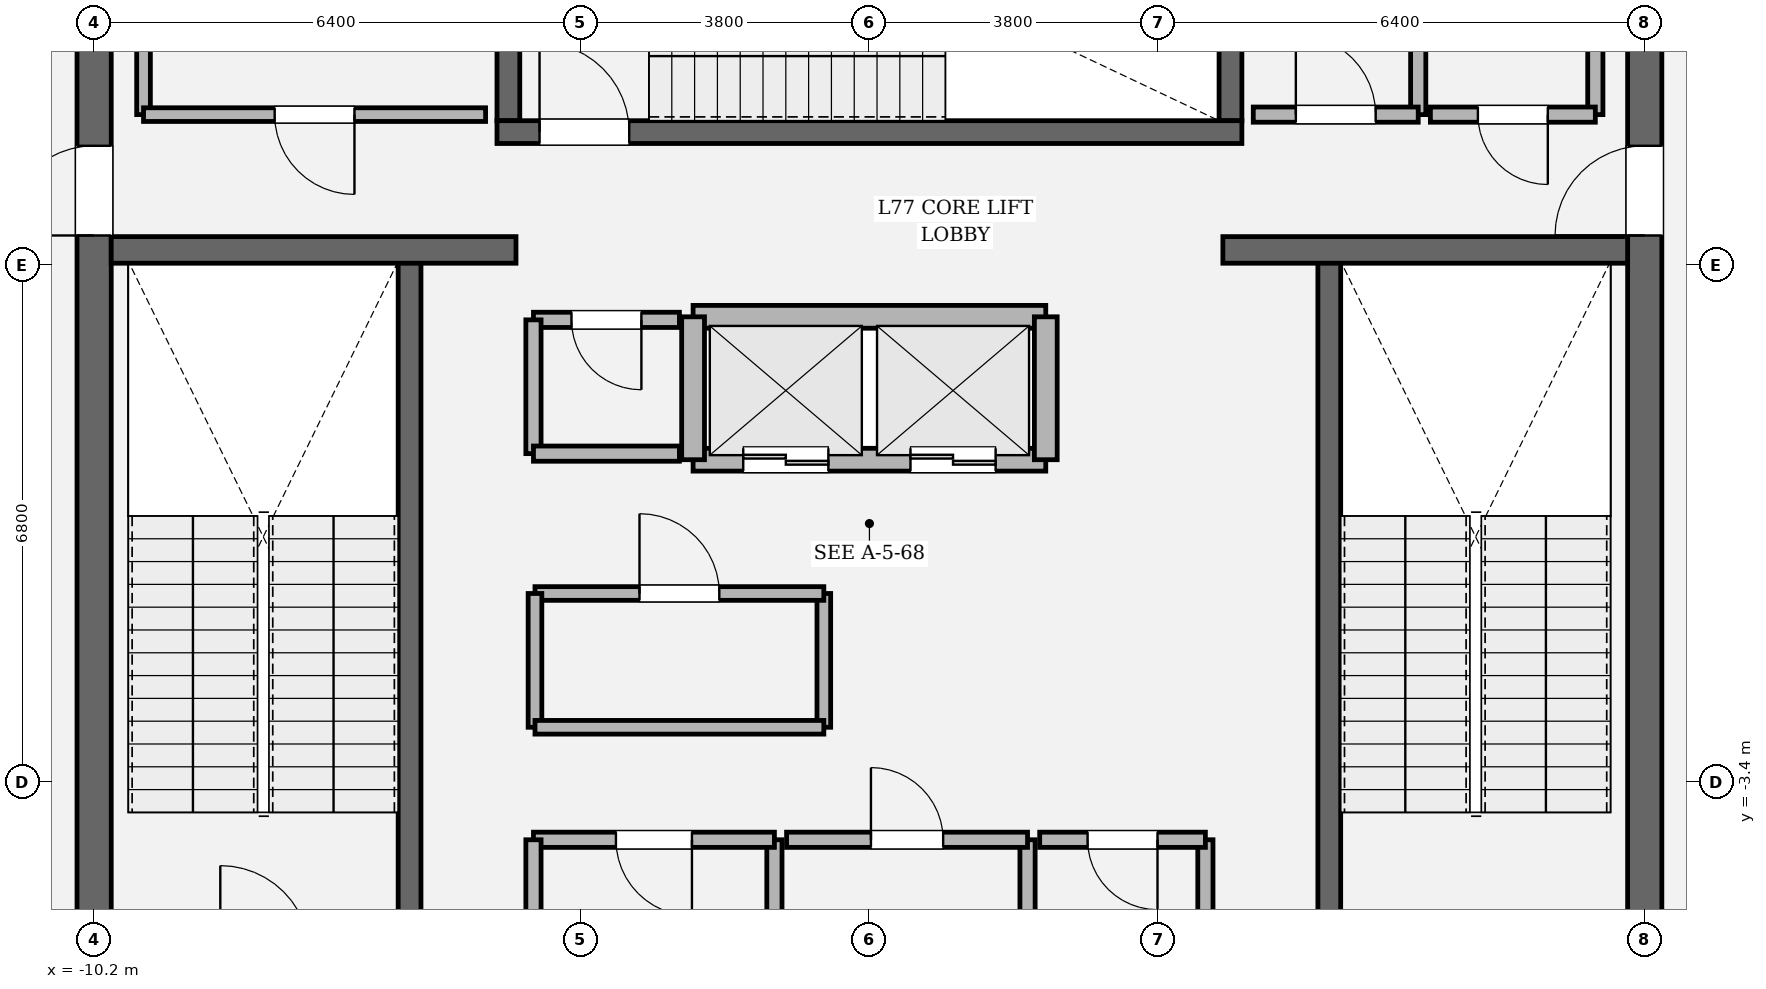
"""IFC4 building model, lengths in metres.
Left out: names, types, materials, properties, quantities, classifications, styles, units other than length and angle.
Written with IfcOpenShell. Run it as: python <this file> out.ifc"""

import sys

from ifc_helpers import new_model, si_unit, direction, frame, frame_2d, origin, place, context, subcontext, project, spatial, rectangle, extrude, element, fill, save


model = new_model("IFC4")
c1 = context("Model", 3, precision=1e-05, world=origin(), true_north=direction((0.0, 1.0)))
c2 = subcontext(c1, "Body", "Model", "MODEL_VIEW")
j1 = project(units=[si_unit("LENGTHUNIT", "METRE"), si_unit("PLANEANGLEUNIT", "RADIAN")], contexts=[c1])
p1 = place(None, origin())
s1 = spatial("IfcSite", under=j1, at=p1, CompositionType="ELEMENT")
p2 = place(p1, origin())
s2 = spatial("IfcBuilding", under=s1, at=p2, CompositionType="ELEMENT")
p3 = place(p2, frame((0.0, 0.0, 325.8)))
s3 = spatial("IfcBuildingStorey", under=s2, at=p3, CompositionType="ELEMENT", Elevation=325.8)
p4 = place(p3, frame((-10.2, -8.975, 0.0), z_axis=(0.0, 0.0, 1.0), x_axis=(0.0, 1.0, 0.0)))
e1 = element("IfcWall", 1, at=p4, inside=s3, PredefinedType="SHEAR", context=c2, shape_type="SweptSolid", body=[
    extrude(rectangle(XDim=17.95, YDim=0.45, at=frame_2d((8.975, 0.0))), origin(), (0.0, 0.0, 1.0), 4.2),
])
p5 = place(p4, frame((12.765, 0.0, 0.0)))
e2 = element("IfcOpeningElement", 2, at=p5, cuts=e1, PredefinedType="OPENING", context=c2, shape_type="SweptSolid", body=[
    extrude(rectangle(XDim=1.18, YDim=2.2, at=frame_2d((0.59, 1.1))), frame((0.0, 0.235, 0.0), z_axis=(0.0, -1.0, 0.0), x_axis=(1.0, 0.0, 0.0)), (0.0, 0.0, 1.0), 0.47),
])
p6 = place(p3, frame((10.2, 8.975, 0.0), z_axis=(0.0, 0.0, 1.0), x_axis=(0.0, -1.0, 0.0)))
e3 = element("IfcWall", 3, at=p6, inside=s3, PredefinedType="SHEAR", context=c2, shape_type="SweptSolid", body=[
    extrude(rectangle(XDim=17.95, YDim=0.45, at=frame_2d((8.975, 0.0))), origin(), (0.0, 0.0, 1.0), 4.2),
])
p7 = place(p6, frame((4.005, 0.0, 0.0)))
e4 = element("IfcOpeningElement", 4, at=p7, cuts=e3, PredefinedType="OPENING", context=c2, shape_type="SweptSolid", body=[
    extrude(rectangle(XDim=1.18, YDim=2.2, at=frame_2d((0.59, 1.1))), frame((0.0, 0.235, 0.0), z_axis=(0.0, -1.0, 0.0), x_axis=(1.0, 0.0, 0.0)), (0.0, 0.0, 1.0), 0.47),
])
for number, where, z_axis, x_axis in (
    (5, (-6.05, -5.5, 0.0), (0.0, 0.0, 1.0), (0.0, 1.0, 0.0)),
    (6, (6.05, 3.45, 0.0), (0.0, 0.0, 1.0), (0.0, -1.0, 0.0)),
):
    element("IfcWall", number, at=place(p3, frame(where, z_axis=z_axis, x_axis=x_axis)), inside=s3, PredefinedType="SOLIDWALL", context=c2, shape_type="SweptSolid", body=[
        extrude(rectangle(XDim=8.95, YDim=0.3, at=frame_2d((4.475, 0.0))), origin(), (0.0, 0.0, 1.0), 4.2),
    ])
for number, where, z_axis, x_axis in (
    (7, (-4.75, 5.3, 0.0), (0.0, 0.0, 1.0), (0.0, 1.0, 0.0)),
    (8, (4.75, 8.975, 0.0), (0.0, 0.0, 1.0), (0.0, -1.0, 0.0)),
):
    element("IfcWall", number, at=place(p3, frame(where, z_axis=z_axis, x_axis=x_axis)), inside=s3, PredefinedType="SOLIDWALL", context=c2, shape_type="SweptSolid", body=[
        extrude(rectangle(XDim=3.675, YDim=0.3, at=frame_2d((1.837, 0.0))), origin(), (0.0, 0.0, 1.0), 4.2),
    ])
p8 = place(p3, frame((-4.9, 5.15, 0.0), z_axis=(0.0, 0.0, 1.0), x_axis=(1.0, 0.0, 0.0)))
e9 = element("IfcWall", 9, at=p8, inside=s3, PredefinedType="SOLIDWALL", context=c2, shape_type="SweptSolid", body=[
    extrude(rectangle(XDim=9.8, YDim=0.3, at=frame_2d((4.9, 0.0))), origin(), (0.0, 0.0, 1.0), 4.2),
])
p9 = place(p8, frame((0.56, 0.0, 0.0)))
e10 = element("IfcOpeningElement", 10, at=p9, cuts=e9, PredefinedType="OPENING", context=c2, shape_type="SweptSolid", body=[
    extrude(rectangle(XDim=1.18, YDim=2.2, at=frame_2d((0.59, 1.1))), frame((0.0, 0.16, 0.0), z_axis=(0.0, -1.0, 0.0), x_axis=(1.0, 0.0, 0.0)), (0.0, 0.0, 1.0), 0.32),
])
for number, where, z_axis, x_axis in (
    (11, (-9.975, 3.6, 0.0), (0.0, 0.0, 1.0), (1.0, 0.0, 0.0)),
    (12, (4.65, 3.6, 0.0), (0.0, 0.0, 1.0), (1.0, 0.0, 0.0)),
):
    element("IfcWall", number, at=place(p3, frame(where, z_axis=z_axis, x_axis=x_axis)), inside=s3, PredefinedType="SOLIDWALL", context=c2, shape_type="SweptSolid", body=[
        extrude(rectangle(XDim=5.325, YDim=0.35, at=frame_2d((2.663, 0.0))), origin(), (0.0, 0.0, 1.0), 4.2),
    ])
p10 = place(p3, frame((-2.32, 0.84, 0.0), z_axis=(0.0, 0.0, 1.0), x_axis=(1.0, 0.0, 0.0)))
e13 = element("IfcWall", 13, at=p10, inside=s3, PredefinedType="SOLIDWALL", context=c2, shape_type="SweptSolid", body=[
    extrude(rectangle(XDim=4.64, YDim=0.3, at=frame_2d((2.32, 0.0))), origin(), (0.0, 0.0, 1.0), 4.0),
])
p11 = place(p10, frame((0.66, 0.0, 0.0)))
e14 = element("IfcOpeningElement", 14, at=p11, cuts=e13, PredefinedType="OPENING", context=c2, shape_type="SweptSolid", body=[
    extrude(rectangle(XDim=1.12, YDim=2.25, at=frame_2d((0.56, 1.125))), frame((0.0, 0.16, 0.0), z_axis=(0.0, -1.0, 0.0), x_axis=(1.0, 0.0, 0.0)), (0.0, 0.0, 1.0), 0.32),
])
p12 = place(p10, frame((2.86, 0.0, 0.0)))
e15 = element("IfcOpeningElement", 15, at=p12, cuts=e13, PredefinedType="OPENING", context=c2, shape_type="SweptSolid", body=[
    extrude(rectangle(XDim=1.12, YDim=2.25, at=frame_2d((0.56, 1.125))), frame((0.0, 0.16, 0.0), z_axis=(0.0, -1.0, 0.0), x_axis=(1.0, 0.0, 0.0)), (0.0, 0.0, 1.0), 0.32),
])
p13 = place(p3, frame((-2.32, 2.72, 0.0), z_axis=(0.0, 0.0, 1.0), x_axis=(1.0, 0.0, 0.0)))
e16 = element("IfcWall", 16, at=p13, inside=s3, PredefinedType="SOLIDWALL", context=c2, shape_type="SweptSolid", body=[
    extrude(rectangle(XDim=4.64, YDim=0.3, at=frame_2d((2.32, 0.0))), origin(), (0.0, 0.0, 1.0), 4.0),
])
for number, where, z_axis, x_axis in (
    (17, (-2.32, 0.84, 0.0), (0.0, 0.0, 1.0), (0.0, 1.0, 0.0)),
    (18, (2.32, 0.84, 0.0), (0.0, 0.0, 1.0), (0.0, 1.0, 0.0)),
):
    element("IfcWall", number, at=place(p3, frame(where, z_axis=z_axis, x_axis=x_axis)), inside=s3, PredefinedType="SOLIDWALL", context=c2, shape_type="SweptSolid", body=[
        extrude(rectangle(XDim=1.88, YDim=0.3, at=frame_2d((0.94, 0.0))), origin(), (0.0, 0.0, 1.0), 4.0),
    ])
p14 = place(p3, frame((-1.25, -5.9, 0.0), z_axis=(0.0, 0.0, 1.0), x_axis=(0.0, 1.0, 0.0)))
e19 = element("IfcWall", 19, at=p14, inside=s3, PredefinedType="SOLIDWALL", context=c2, shape_type="SweptSolid", body=[
    extrude(rectangle(XDim=1.74, YDim=0.2, at=frame_2d((0.87, 0.0))), origin(), (0.0, 0.0, 1.0), 4.0),
])
p15 = place(p3, frame((-1.25, -4.16, 0.0), z_axis=(0.0, 0.0, 1.0), x_axis=(-1.0, 0.0, 0.0)))
e20 = element("IfcWall", 20, at=p15, inside=s3, PredefinedType="SOLIDWALL", context=c2, shape_type="SweptSolid", body=[
    extrude(rectangle(XDim=3.17, YDim=0.2, at=frame_2d((1.585, 0.0))), origin(), (0.0, 0.0, 1.0), 4.0),
])
p16 = place(p15, frame((1.085, 0.0, 0.0)))
e21 = element("IfcOpeningElement", 21, at=p16, cuts=e20, PredefinedType="OPENING", context=c2, shape_type="SweptSolid", body=[
    extrude(rectangle(XDim=1.0, YDim=2.15, at=frame_2d((0.5, 1.075))), frame((0.0, 0.11, 0.0), z_axis=(0.0, -1.0, 0.0), x_axis=(1.0, 0.0, 0.0)), (0.0, 0.0, 1.0), 0.22),
])
for number, where, z_axis, x_axis in (
    (22, (-4.42, -4.16, 0.0), (0.0, 0.0, 1.0), (0.0, -1.0, 0.0)),
    (23, (2.08, -5.9, 0.0), (0.0, 0.0, 1.0), (0.0, 1.0, 0.0)),
):
    element("IfcWall", number, at=place(p3, frame(where, z_axis=z_axis, x_axis=x_axis)), inside=s3, PredefinedType="SOLIDWALL", context=c2, shape_type="SweptSolid", body=[
        extrude(rectangle(XDim=1.74, YDim=0.2, at=frame_2d((0.87, 0.0))), origin(), (0.0, 0.0, 1.0), 4.0),
    ])
p17 = place(p3, frame((2.08, -4.16, 0.0), z_axis=(0.0, 0.0, 1.0), x_axis=(-1.0, 0.0, 0.0)))
e24 = element("IfcWall", 24, at=p17, inside=s3, PredefinedType="SOLIDWALL", context=c2, shape_type="SweptSolid", body=[
    extrude(rectangle(XDim=3.17, YDim=0.2, at=frame_2d((1.585, 0.0))), origin(), (0.0, 0.0, 1.0), 4.0),
])
p18 = place(p17, frame((1.11, 0.0, 0.0)))
e25 = element("IfcOpeningElement", 25, at=p18, cuts=e24, PredefinedType="OPENING", context=c2, shape_type="SweptSolid", body=[
    extrude(rectangle(XDim=0.95, YDim=2.15, at=frame_2d((0.475, 1.075))), frame((0.0, 0.11, 0.0), z_axis=(0.0, -1.0, 0.0), x_axis=(1.0, 0.0, 0.0)), (0.0, 0.0, 1.0), 0.22),
])
p19 = place(p3, frame((4.42, -5.9, 0.0), z_axis=(0.0, 0.0, 1.0), x_axis=(0.0, 1.0, 0.0)))
e26 = element("IfcWall", 26, at=p19, inside=s3, PredefinedType="SOLIDWALL", context=c2, shape_type="SweptSolid", body=[
    extrude(rectangle(XDim=1.74, YDim=0.2, at=frame_2d((0.87, 0.0))), origin(), (0.0, 0.0, 1.0), 4.0),
])
p20 = place(p3, frame((4.42, -4.16, 0.0), z_axis=(0.0, 0.0, 1.0), x_axis=(-1.0, 0.0, 0.0)))
e27 = element("IfcWall", 27, at=p20, inside=s3, PredefinedType="SOLIDWALL", context=c2, shape_type="SweptSolid", body=[
    extrude(rectangle(XDim=2.18, YDim=0.2, at=frame_2d((1.09, 0.0))), origin(), (0.0, 0.0, 1.0), 4.0),
])
p21 = place(p20, frame((0.63, 0.0, 0.0)))
e28 = element("IfcOpeningElement", 28, at=p21, cuts=e27, PredefinedType="OPENING", context=c2, shape_type="SweptSolid", body=[
    extrude(rectangle(XDim=0.92, YDim=2.1, at=frame_2d((0.46, 1.05))), frame((0.0, 0.11, 0.0), z_axis=(0.0, -1.0, 0.0), x_axis=(1.0, 0.0, 0.0)), (0.0, 0.0, 1.0), 0.22),
])
p22 = place(p3, frame((-0.6, -2.68, 0.0), z_axis=(0.0, 0.0, 1.0), x_axis=(0.0, 1.0, 0.0)))
e29 = element("IfcWall", 29, at=p22, inside=s3, PredefinedType="PARTITIONING", context=c2, shape_type="SweptSolid", body=[
    extrude(rectangle(XDim=1.76, YDim=0.18, at=frame_2d((0.88, 0.0))), origin(), (0.0, 0.0, 1.0), 4.0),
])
p23 = place(p3, frame((-0.6, -0.92, 0.0), z_axis=(0.0, 0.0, 1.0), x_axis=(-1.0, 0.0, 0.0)))
e30 = element("IfcWall", 30, at=p23, inside=s3, PredefinedType="PARTITIONING", context=c2, shape_type="SweptSolid", body=[
    extrude(rectangle(XDim=3.8, YDim=0.18, at=frame_2d((1.9, 0.0))), origin(), (0.0, 0.0, 1.0), 4.0),
])
p24 = place(p23, frame((1.375, 0.0, 0.0)))
e31 = element("IfcOpeningElement", 31, at=p24, cuts=e30, PredefinedType="OPENING", context=c2, shape_type="SweptSolid", body=[
    extrude(rectangle(XDim=1.05, YDim=2.2, at=frame_2d((0.525, 1.1))), frame((0.0, 0.1, 0.0), z_axis=(0.0, -1.0, 0.0), x_axis=(1.0, 0.0, 0.0)), (0.0, 0.0, 1.0), 0.2),
])
p25 = place(p3, frame((-4.4, -0.92, 0.0), z_axis=(0.0, 0.0, 1.0), x_axis=(0.0, -1.0, 0.0)))
e32 = element("IfcWall", 32, at=p25, inside=s3, PredefinedType="PARTITIONING", context=c2, shape_type="SweptSolid", body=[
    extrude(rectangle(XDim=1.76, YDim=0.18, at=frame_2d((0.88, 0.0))), origin(), (0.0, 0.0, 1.0), 4.0),
])
p26 = place(p3, frame((-4.4, -2.68, 0.0), z_axis=(0.0, 0.0, 1.0), x_axis=(1.0, 0.0, 0.0)))
e33 = element("IfcWall", 33, at=p26, inside=s3, PredefinedType="PARTITIONING", context=c2, shape_type="SweptSolid", body=[
    extrude(rectangle(XDim=3.8, YDim=0.18, at=frame_2d((1.9, 0.0))), origin(), (0.0, 0.0, 1.0), 4.0),
])
p27 = place(p3, frame((-2.5, 2.68, 0.0), z_axis=(0.0, 0.0, 1.0), x_axis=(-1.0, 0.0, 0.0)))
e34 = element("IfcWall", 34, at=p27, inside=s3, PredefinedType="SOLIDWALL", context=c2, shape_type="SweptSolid", body=[
    extrude(rectangle(XDim=1.92, YDim=0.2, at=frame_2d((0.96, 0.0))), origin(), (0.0, 0.0, 1.0), 4.0),
])
p28 = place(p27, frame((0.5, 0.0, 0.0)))
e35 = element("IfcOpeningElement", 35, at=p28, cuts=e34, PredefinedType="OPENING", context=c2, shape_type="SweptSolid", body=[
    extrude(rectangle(XDim=0.92, YDim=2.1, at=frame_2d((0.46, 1.05))), frame((0.0, 0.11, 0.0), z_axis=(0.0, -1.0, 0.0), x_axis=(1.0, 0.0, 0.0)), (0.0, 0.0, 1.0), 0.22),
])
p29 = place(p3, frame((-4.42, 2.68, 0.0), z_axis=(0.0, 0.0, 1.0), x_axis=(0.0, -1.0, 0.0)))
e36 = element("IfcWall", 36, at=p29, inside=s3, PredefinedType="SOLIDWALL", context=c2, shape_type="SweptSolid", body=[
    extrude(rectangle(XDim=1.76, YDim=0.2, at=frame_2d((0.88, 0.0))), origin(), (0.0, 0.0, 1.0), 4.0),
])
p30 = place(p3, frame((-4.42, 0.92, 0.0), z_axis=(0.0, 0.0, 1.0), x_axis=(1.0, 0.0, 0.0)))
e37 = element("IfcWall", 37, at=p30, inside=s3, PredefinedType="SOLIDWALL", context=c2, shape_type="SweptSolid", body=[
    extrude(rectangle(XDim=1.92, YDim=0.2, at=frame_2d((0.96, 0.0))), origin(), (0.0, 0.0, 1.0), 4.0),
])
p31 = place(p3, frame((-9.55, 8.65, 0.0), z_axis=(0.0, 0.0, 1.0), x_axis=(0.0, -1.0, 0.0)))
e38 = element("IfcWall", 38, at=p31, inside=s3, PredefinedType="PARTITIONING", context=c2, shape_type="SweptSolid", body=[
    extrude(rectangle(XDim=3.27, YDim=0.18, at=frame_2d((1.635, 0.0))), origin(), (0.0, 0.0, 1.0), 4.0),
])
p32 = place(p3, frame((-9.55, 5.38, 0.0), z_axis=(0.0, 0.0, 1.0), x_axis=(1.0, 0.0, 0.0)))
e39 = element("IfcWall", 39, at=p32, inside=s3, PredefinedType="PARTITIONING", context=c2, shape_type="SweptSolid", body=[
    extrude(rectangle(XDim=4.5, YDim=0.18, at=frame_2d((2.25, 0.0))), origin(), (0.0, 0.0, 1.0), 4.0),
])
p33 = place(p32, frame((1.725, 0.0, 0.0)))
e40 = element("IfcOpeningElement", 40, at=p33, cuts=e39, PredefinedType="OPENING", context=c2, shape_type="SweptSolid", body=[
    extrude(rectangle(XDim=1.05, YDim=2.2, at=frame_2d((0.525, 1.1))), frame((0.0, 0.1, 0.0), z_axis=(0.0, -1.0, 0.0), x_axis=(1.0, 0.0, 0.0)), (0.0, 0.0, 1.0), 0.2),
])
p34 = place(p3, frame((7.22, 5.38, 0.0), z_axis=(0.0, 0.0, 1.0), x_axis=(0.0, 1.0, 0.0)))
e41 = element("IfcWall", 41, at=p34, inside=s3, PredefinedType="SOLIDWALL", context=c2, shape_type="SweptSolid", body=[
    extrude(rectangle(XDim=3.27, YDim=0.2, at=frame_2d((1.635, 0.0))), origin(), (0.0, 0.0, 1.0), 4.0),
])
p35 = place(p3, frame((5.05, 5.38, 0.0), z_axis=(0.0, 0.0, 1.0), x_axis=(1.0, 0.0, 0.0)))
e42 = element("IfcWall", 42, at=p35, inside=s3, PredefinedType="SOLIDWALL", context=c2, shape_type="SweptSolid", body=[
    extrude(rectangle(XDim=2.17, YDim=0.2, at=frame_2d((1.085, 0.0))), origin(), (0.0, 0.0, 1.0), 4.0),
])
p36 = place(p35, frame((0.56, 0.0, 0.0)))
e43 = element("IfcOpeningElement", 43, at=p36, cuts=e42, PredefinedType="OPENING", context=c2, shape_type="SweptSolid", body=[
    extrude(rectangle(XDim=1.05, YDim=2.2, at=frame_2d((0.525, 1.1))), frame((0.0, 0.11, 0.0), z_axis=(0.0, -1.0, 0.0), x_axis=(1.0, 0.0, 0.0)), (0.0, 0.0, 1.0), 0.22),
])
p37 = place(p3, frame((9.55, 5.38, 0.0), z_axis=(0.0, 0.0, 1.0), x_axis=(0.0, 1.0, 0.0)))
e44 = element("IfcWall", 44, at=p37, inside=s3, PredefinedType="SOLIDWALL", context=c2, shape_type="SweptSolid", body=[
    extrude(rectangle(XDim=3.27, YDim=0.2, at=frame_2d((1.635, 0.0))), origin(), (0.0, 0.0, 1.0), 4.0),
])
p38 = place(p3, frame((7.38, 5.38, 0.0), z_axis=(0.0, 0.0, 1.0), x_axis=(1.0, 0.0, 0.0)))
e45 = element("IfcWall", 45, at=p38, inside=s3, PredefinedType="SOLIDWALL", context=c2, shape_type="SweptSolid", body=[
    extrude(rectangle(XDim=2.17, YDim=0.2, at=frame_2d((1.085, 0.0))), origin(), (0.0, 0.0, 1.0), 4.0),
])
p39 = place(p38, frame((0.625, 0.0, 0.0)))
e46 = element("IfcOpeningElement", 46, at=p39, cuts=e45, PredefinedType="OPENING", context=c2, shape_type="SweptSolid", body=[
    extrude(rectangle(XDim=0.92, YDim=2.1, at=frame_2d((0.46, 1.05))), frame((0.0, 0.11, 0.0), z_axis=(0.0, -1.0, 0.0), x_axis=(1.0, 0.0, 0.0)), (0.0, 0.0, 1.0), 0.22),
])
p40 = place(p9, origin())
e47 = element("IfcDoor", 47, at=p40, inside=s3, OperationType="SINGLE_SWING_LEFT", PredefinedType="DOOR", context=c2, shape_type="SweptSolid", body=[
    extrude(rectangle(XDim=1.18, YDim=2.2, at=frame_2d((0.59, 1.1))), frame((0.0, 0.025, 0.0), z_axis=(0.0, -1.0, 0.0), x_axis=(1.0, 0.0, 0.0)), (0.0, 0.0, 1.0), 0.05),
])
fill(e10, e47)
p41 = place(p5, origin())
e48 = element("IfcDoor", 48, at=p41, inside=s3, OperationType="SINGLE_SWING_LEFT", PredefinedType="DOOR", context=c2, shape_type="SweptSolid", body=[
    extrude(rectangle(XDim=1.18, YDim=2.2, at=frame_2d((0.59, 1.1))), frame((0.0, 0.025, 0.0), z_axis=(0.0, -1.0, 0.0), x_axis=(1.0, 0.0, 0.0)), (0.0, 0.0, 1.0), 0.05),
])
fill(e2, e48)
p42 = place(p7, origin())
e49 = element("IfcDoor", 49, at=p42, inside=s3, OperationType="SINGLE_SWING_RIGHT", PredefinedType="DOOR", context=c2, shape_type="SweptSolid", body=[
    extrude(rectangle(XDim=1.18, YDim=2.2, at=frame_2d((0.59, 1.1))), frame((0.0, 0.025, 0.0), z_axis=(0.0, -1.0, 0.0), x_axis=(1.0, 0.0, 0.0)), (0.0, 0.0, 1.0), 0.05),
])
fill(e4, e49)
p43 = place(p11, origin())
e50 = element("IfcDoor", 50, at=p43, inside=s3, OperationType="DOUBLE_DOOR_SLIDING", PredefinedType="DOOR", context=c2, shape_type="SweptSolid", body=[
    extrude(rectangle(XDim=1.12, YDim=2.25, at=frame_2d((0.56, 1.125))), frame((0.0, 0.025, 0.0), z_axis=(0.0, -1.0, 0.0), x_axis=(1.0, 0.0, 0.0)), (0.0, 0.0, 1.0), 0.05),
])
fill(e14, e50)
p44 = place(p12, origin())
e51 = element("IfcDoor", 51, at=p44, inside=s3, OperationType="DOUBLE_DOOR_SLIDING", PredefinedType="DOOR", context=c2, shape_type="SweptSolid", body=[
    extrude(rectangle(XDim=1.12, YDim=2.25, at=frame_2d((0.56, 1.125))), frame((0.0, 0.025, 0.0), z_axis=(0.0, -1.0, 0.0), x_axis=(1.0, 0.0, 0.0)), (0.0, 0.0, 1.0), 0.05),
])
fill(e15, e51)
p45 = place(p16, origin())
e52 = element("IfcDoor", 52, at=p45, inside=s3, OperationType="SINGLE_SWING_LEFT", PredefinedType="DOOR", context=c2, shape_type="SweptSolid", body=[
    extrude(rectangle(XDim=1.0, YDim=2.15, at=frame_2d((0.5, 1.075))), frame((0.0, 0.025, 0.0), z_axis=(0.0, -1.0, 0.0), x_axis=(1.0, 0.0, 0.0)), (0.0, 0.0, 1.0), 0.05),
])
fill(e21, e52)
p46 = place(p18, origin())
e53 = element("IfcDoor", 53, at=p46, inside=s3, OperationType="SINGLE_SWING_RIGHT", PredefinedType="DOOR", context=c2, shape_type="SweptSolid", body=[
    extrude(rectangle(XDim=0.95, YDim=2.15, at=frame_2d((0.475, 1.075))), frame((0.0, 0.025, 0.0), z_axis=(0.0, -1.0, 0.0), x_axis=(1.0, 0.0, 0.0)), (0.0, 0.0, 1.0), 0.05),
])
fill(e25, e53)
p47 = place(p21, origin())
e54 = element("IfcDoor", 54, at=p47, inside=s3, OperationType="SINGLE_SWING_LEFT", PredefinedType="DOOR", context=c2, shape_type="SweptSolid", body=[
    extrude(rectangle(XDim=0.92, YDim=2.1, at=frame_2d((0.46, 1.05))), frame((0.0, 0.025, 0.0), z_axis=(0.0, -1.0, 0.0), x_axis=(1.0, 0.0, 0.0)), (0.0, 0.0, 1.0), 0.05),
])
fill(e28, e54)
p48 = place(p24, origin())
e55 = element("IfcDoor", 55, at=p48, inside=s3, OperationType="SINGLE_SWING_RIGHT", PredefinedType="DOOR", context=c2, shape_type="SweptSolid", body=[
    extrude(rectangle(XDim=1.05, YDim=2.2, at=frame_2d((0.525, 1.1))), frame((0.0, 0.025, 0.0), z_axis=(0.0, -1.0, 0.0), x_axis=(1.0, 0.0, 0.0)), (0.0, 0.0, 1.0), 0.05),
])
fill(e31, e55)
p49 = place(p28, origin())
e56 = element("IfcDoor", 56, at=p49, inside=s3, OperationType="SINGLE_SWING_LEFT", PredefinedType="DOOR", context=c2, shape_type="SweptSolid", body=[
    extrude(rectangle(XDim=0.92, YDim=2.1, at=frame_2d((0.46, 1.05))), frame((0.0, 0.025, 0.0), z_axis=(0.0, -1.0, 0.0), x_axis=(1.0, 0.0, 0.0)), (0.0, 0.0, 1.0), 0.05),
])
fill(e35, e56)
p50 = place(p33, origin())
e57 = element("IfcDoor", 57, at=p50, inside=s3, OperationType="SINGLE_SWING_RIGHT", PredefinedType="DOOR", context=c2, shape_type="SweptSolid", body=[
    extrude(rectangle(XDim=1.05, YDim=2.2, at=frame_2d((0.525, 1.1))), frame((0.0, 0.025, 0.0), z_axis=(0.0, -1.0, 0.0), x_axis=(1.0, 0.0, 0.0)), (0.0, 0.0, 1.0), 0.05),
])
fill(e40, e57)
p51 = place(p36, origin())
e58 = element("IfcDoor", 58, at=p51, inside=s3, OperationType="SINGLE_SWING_LEFT", PredefinedType="DOOR", context=c2, shape_type="SweptSolid", body=[
    extrude(rectangle(XDim=1.05, YDim=2.2, at=frame_2d((0.525, 1.1))), frame((0.0, 0.025, 0.0), z_axis=(0.0, -1.0, 0.0), x_axis=(1.0, 0.0, 0.0)), (0.0, 0.0, 1.0), 0.05),
])
fill(e43, e58)
p52 = place(p39, origin())
e59 = element("IfcDoor", 59, at=p52, inside=s3, OperationType="SINGLE_SWING_RIGHT", PredefinedType="DOOR", context=c2, shape_type="SweptSolid", body=[
    extrude(rectangle(XDim=0.92, YDim=2.1, at=frame_2d((0.46, 1.05))), frame((0.0, 0.025, 0.0), z_axis=(0.0, -1.0, 0.0), x_axis=(1.0, 0.0, 0.0)), (0.0, 0.0, 1.0), 0.05),
])
fill(e46, e59)
save(model, sys.argv[1])
